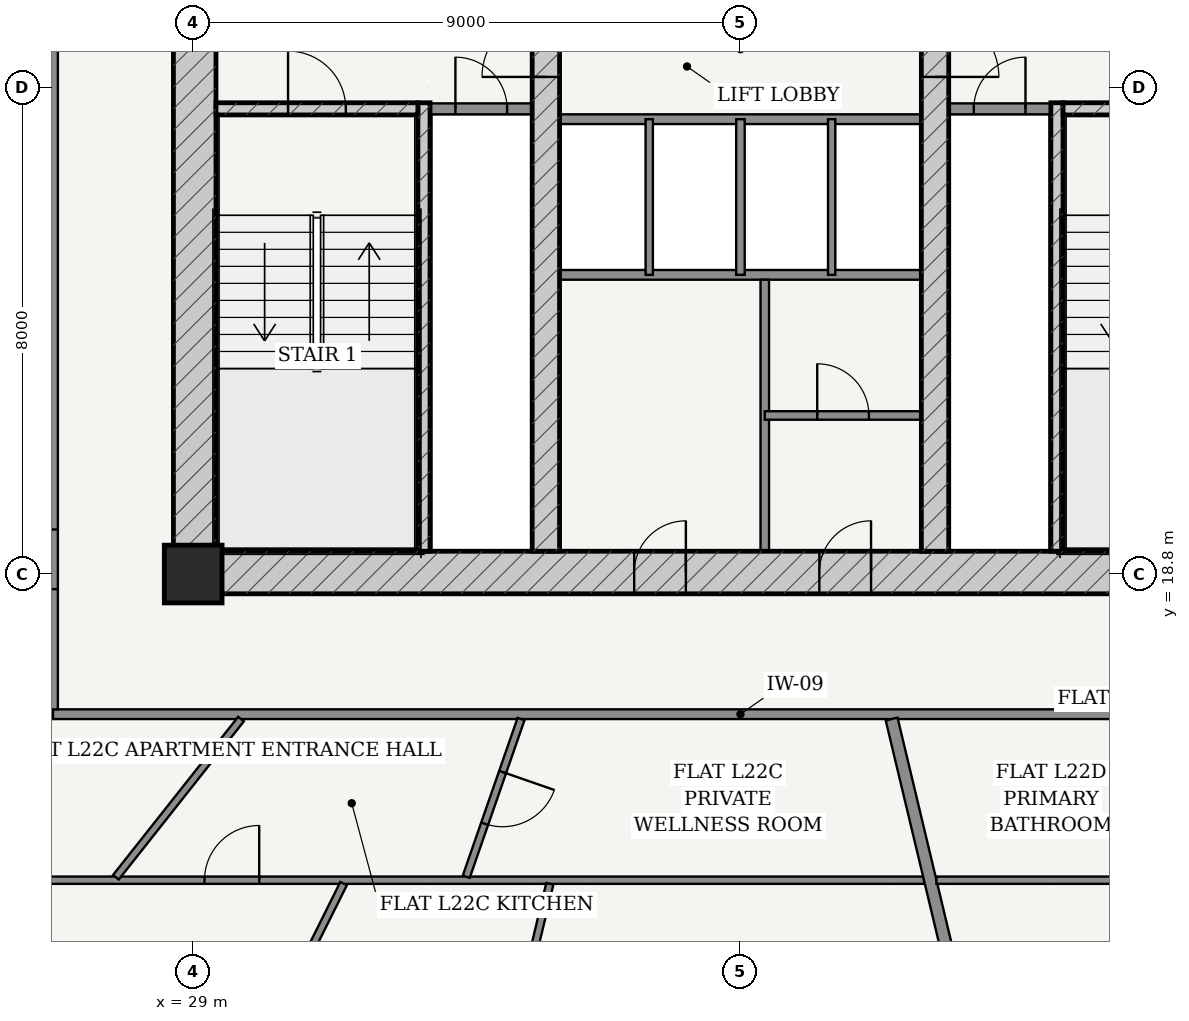
"""IFC4 building model, lengths in metres.
Left out: names, types, materials, properties, quantities, classifications, styles, units other than length and angle.
Written with IfcOpenShell. Run it as: python <this file> out.ifc"""

import sys

from ifc_helpers import new_model, si_unit, direction, frame, frame_2d, origin, origin_2d, place, context, subcontext, project, spatial, rectangle, extrude, source, transform, mapped, element, fill, save


model = new_model("IFC4")
c1 = context("Model", 3, precision=1e-05, world=origin(), true_north=direction((-0.2419218956, 0.970295726276)))
c2 = subcontext(c1, "Body", "Model", "MODEL_VIEW")
j1 = project(units=[si_unit("LENGTHUNIT", "METRE"), si_unit("PLANEANGLEUNIT", "RADIAN")], contexts=[c1])
p1 = place(None, origin())
s1 = spatial("IfcSite", under=j1, at=p1, CompositionType="ELEMENT")
p2 = place(p1, origin())
s2 = spatial("IfcBuilding", under=s1, at=p2, CompositionType="ELEMENT")
p3 = place(p2, frame((0.0, 0.0, 87.0)))
s3 = spatial("IfcBuildingStorey", under=s2, at=p3, CompositionType="ELEMENT", Elevation=87.0)
p4 = place(p3, frame((29.0, 18.8, 0.0), z_axis=(0.0, 0.0, 1.0), x_axis=(1.0, 0.0, 0.0)))
e1 = element("IfcColumn", 1, at=p4, inside=s3, PredefinedType="COLUMN", context=c2, shape_type="SweptSolid", body=[
    extrude(rectangle(XDim=0.95, YDim=0.95, at=origin_2d()), origin(), (0.0, 0.0, 1.0), 3.6),
])
p5 = place(p3, frame((28.675, 18.825, 0.0), z_axis=(0.0, 0.0, 1.0), x_axis=(1.0, 0.0, 0.0)))
e2 = element("IfcWall", 2, at=p5, inside=s3, PredefinedType="SHEAR", context=c2, shape_type="SweptSolid", body=[
    extrude(rectangle(XDim=18.65, YDim=0.7, at=frame_2d((9.325, 0.0))), origin(), (0.0, 0.0, 1.0), 3.325),
])
p6 = place(p5, frame((7.577, 0.0, 0.0)))
e3 = element("IfcOpeningElement", 3, at=p6, cuts=e2, PredefinedType="OPENING", context=c2, shape_type="SweptSolid", body=[
    extrude(rectangle(XDim=0.85, YDim=2.1, at=frame_2d((0.425, 1.05))), frame((0.0, 0.36, 0.0), z_axis=(0.0, -1.0, 0.0), x_axis=(1.0, 0.0, 0.0)), (0.0, 0.0, 1.0), 0.72),
])
p7 = place(p5, frame((10.623, 0.0, 0.0)))
e4 = element("IfcOpeningElement", 4, at=p7, cuts=e2, PredefinedType="OPENING", context=c2, shape_type="SweptSolid", body=[
    extrude(rectangle(XDim=0.85, YDim=2.1, at=frame_2d((0.425, 1.05))), frame((0.0, 0.36, 0.0), z_axis=(0.0, -1.0, 0.0), x_axis=(1.0, 0.0, 0.0)), (0.0, 0.0, 1.0), 0.72),
])
p8 = place(p3, frame((29.025, 19.175, 0.0), z_axis=(0.0, 0.0, 1.0), x_axis=(0.0, 1.0, 0.0)))
e5 = element("IfcWall", 5, at=p8, inside=s3, PredefinedType="SHEAR", context=c2, shape_type="SweptSolid", body=[
    extrude(rectangle(XDim=15.25, YDim=0.7, at=frame_2d((7.625, 0.0))), origin(), (0.0, 0.0, 1.0), 3.325),
])
p9 = place(p8, frame((9.875, 0.0, 0.0)))
e6 = element("IfcOpeningElement", 6, at=p9, cuts=e5, PredefinedType="OPENING", context=c2, shape_type="SweptSolid", body=[
    extrude(rectangle(XDim=1.5, YDim=2.2, at=frame_2d((0.75, 1.1))), frame((0.0, 0.36, 0.0), z_axis=(0.0, -1.0, 0.0), x_axis=(1.0, 0.0, 0.0)), (0.0, 0.0, 1.0), 0.72),
])
p10 = place(p3, frame((32.795, 19.175, 0.0), z_axis=(0.0, 0.0, 1.0), x_axis=(0.0, 1.0, 0.0)))
e7 = element("IfcWall", 7, at=p10, inside=s3, PredefinedType="SOLIDWALL", context=c2, shape_type="SweptSolid", body=[
    extrude(rectangle(XDim=7.375, YDim=0.2, at=frame_2d((3.688, 0.0))), origin(), (0.0, 0.0, 1.0), 3.325),
])
p11 = place(p3, frame((29.375, 26.45, 0.0), z_axis=(0.0, 0.0, 1.0), x_axis=(1.0, 0.0, 0.0)))
e8 = element("IfcWall", 8, at=p11, inside=s3, PredefinedType="SOLIDWALL", context=c2, shape_type="SweptSolid", body=[
    extrude(rectangle(XDim=3.32, YDim=0.2, at=frame_2d((1.66, 0.0))), origin(), (0.0, 0.0, 1.0), 3.325),
])
p12 = place(p11, frame((1.185, 0.0, 0.0)))
e9 = element("IfcOpeningElement", 9, at=p12, cuts=e8, PredefinedType="OPENING", context=c2, shape_type="SweptSolid", body=[
    extrude(rectangle(XDim=0.95, YDim=2.15, at=frame_2d((0.475, 1.075))), frame((0.0, 0.11, 0.0), z_axis=(0.0, -1.0, 0.0), x_axis=(1.0, 0.0, 0.0)), (0.0, 0.0, 1.0), 0.22),
])
p13 = place(p3, frame((43.205, 19.175, 0.0), z_axis=(0.0, 0.0, 1.0), x_axis=(0.0, 1.0, 0.0)))
e10 = element("IfcWall", 10, at=p13, inside=s3, PredefinedType="SOLIDWALL", context=c2, shape_type="SweptSolid", body=[
    extrude(rectangle(XDim=7.375, YDim=0.2, at=frame_2d((3.688, 0.0))), origin(), (0.0, 0.0, 1.0), 3.325),
])
p14 = place(p3, frame((43.305, 26.45, 0.0), z_axis=(0.0, 0.0, 1.0), x_axis=(1.0, 0.0, 0.0)))
e11 = element("IfcWall", 11, at=p14, inside=s3, PredefinedType="SOLIDWALL", context=c2, shape_type="SweptSolid", body=[
    extrude(rectangle(XDim=3.32, YDim=0.2, at=frame_2d((1.66, 0.0))), origin(), (0.0, 0.0, 1.0), 3.325),
])
p15 = place(p14, frame((1.185, 0.0, 0.0)))
e12 = element("IfcOpeningElement", 12, at=p15, cuts=e11, PredefinedType="OPENING", context=c2, shape_type="SweptSolid", body=[
    extrude(rectangle(XDim=0.95, YDim=2.15, at=frame_2d((0.475, 1.075))), frame((0.0, 0.11, 0.0), z_axis=(0.0, -1.0, 0.0), x_axis=(1.0, 0.0, 0.0)), (0.0, 0.0, 1.0), 0.22),
])
p16 = place(p3, frame((34.8, 19.175, 0.0), z_axis=(0.0, 0.0, 1.0), x_axis=(0.0, 1.0, 0.0)))
e13 = element("IfcWall", 13, at=p16, inside=s3, PredefinedType="SHEAR", context=c2, shape_type="SweptSolid", body=[
    extrude(rectangle(XDim=15.25, YDim=0.45, at=frame_2d((7.625, 0.0))), origin(), (0.0, 0.0, 1.0), 3.325),
])
p17 = place(p16, frame((7.8, 0.0, 0.0)))
e14 = element("IfcOpeningElement", 14, at=p17, cuts=e13, PredefinedType="OPENING", context=c2, shape_type="SweptSolid", body=[
    extrude(rectangle(XDim=1.05, YDim=2.15, at=frame_2d((0.525, 1.075))), frame((0.0, 0.235, 0.0), z_axis=(0.0, -1.0, 0.0), x_axis=(1.0, 0.0, 0.0)), (0.0, 0.0, 1.0), 0.47),
])
p18 = place(p3, frame((41.2, 19.175, 0.0), z_axis=(0.0, 0.0, 1.0), x_axis=(0.0, 1.0, 0.0)))
e15 = element("IfcWall", 15, at=p18, inside=s3, PredefinedType="SHEAR", context=c2, shape_type="SweptSolid", body=[
    extrude(rectangle(XDim=15.25, YDim=0.45, at=frame_2d((7.625, 0.0))), origin(), (0.0, 0.0, 1.0), 3.325),
])
p19 = place(p18, frame((7.8, 0.0, 0.0)))
e16 = element("IfcOpeningElement", 16, at=p19, cuts=e15, PredefinedType="OPENING", context=c2, shape_type="SweptSolid", body=[
    extrude(rectangle(XDim=1.05, YDim=2.15, at=frame_2d((0.525, 1.075))), frame((0.0, 0.235, 0.0), z_axis=(0.0, -1.0, 0.0), x_axis=(1.0, 0.0, 0.0)), (0.0, 0.0, 1.0), 0.47),
])
p20 = place(p3, frame((32.9, 26.45, 0.0), z_axis=(0.0, 0.0, 1.0), x_axis=(1.0, 0.0, 0.0)))
e17 = element("IfcWall", 17, at=p20, inside=s3, PredefinedType="PARTITIONING", context=c2, shape_type="SweptSolid", body=[
    extrude(rectangle(XDim=1.675, YDim=0.18, at=frame_2d((0.837, 0.0))), origin(), (0.0, 0.0, 1.0), 3.325),
])
p21 = place(p20, frame((0.413, 0.0, 0.0)))
e18 = element("IfcOpeningElement", 18, at=p21, cuts=e17, PredefinedType="OPENING", context=c2, shape_type="SweptSolid", body=[
    extrude(rectangle(XDim=0.85, YDim=2.1, at=frame_2d((0.425, 1.05))), frame((0.0, 0.1, 0.0), z_axis=(0.0, -1.0, 0.0), x_axis=(1.0, 0.0, 0.0)), (0.0, 0.0, 1.0), 0.2),
])
p22 = place(p3, frame((41.425, 26.45, 0.0), z_axis=(0.0, 0.0, 1.0), x_axis=(1.0, 0.0, 0.0)))
e19 = element("IfcWall", 19, at=p22, inside=s3, PredefinedType="PARTITIONING", context=c2, shape_type="SweptSolid", body=[
    extrude(rectangle(XDim=1.675, YDim=0.18, at=frame_2d((0.837, 0.0))), origin(), (0.0, 0.0, 1.0), 3.325),
])
p23 = place(p22, frame((0.413, 0.0, 0.0)))
e20 = element("IfcOpeningElement", 20, at=p23, cuts=e19, PredefinedType="OPENING", context=c2, shape_type="SweptSolid", body=[
    extrude(rectangle(XDim=0.85, YDim=2.1, at=frame_2d((0.425, 1.05))), frame((0.0, 0.1, 0.0), z_axis=(0.0, -1.0, 0.0), x_axis=(1.0, 0.0, 0.0)), (0.0, 0.0, 1.0), 0.2),
])
for number, where, z_axis, x_axis in (
    (21, (35.025, 26.28, 0.0), (0.0, 0.0, 1.0), (1.0, 0.0, 0.0)),
    (22, (35.025, 23.72, 0.0), (0.0, 0.0, 1.0), (1.0, 0.0, 0.0)),
):
    element("IfcWall", number, at=place(p3, frame(where, z_axis=z_axis, x_axis=x_axis)), inside=s3, PredefinedType="PARTITIONING", context=c2, shape_type="SweptSolid", body=[
        extrude(rectangle(XDim=5.95, YDim=0.16, at=frame_2d((2.975, 0.0))), origin(), (0.0, 0.0, 1.0), 3.325),
    ])
p24 = place(p3, frame((36.5, 23.72, 0.0), z_axis=(0.0, 0.0, 1.0), x_axis=(0.0, 1.0, 0.0)))
e23 = element("IfcWall", 23, at=p24, inside=s3, PredefinedType="PARTITIONING", context=c2, shape_type="SweptSolid", body=[
    extrude(rectangle(XDim=2.56, YDim=0.12, at=frame_2d((1.28, 0.0))), origin(), (0.0, 0.0, 1.0), 3.325),
])
p25 = place(p3, frame((38.0, 23.72, 0.0), z_axis=(0.0, 0.0, 1.0), x_axis=(0.0, 1.0, 0.0)))
e24 = element("IfcWall", 24, at=p25, inside=s3, PredefinedType="PARTITIONING", context=c2, shape_type="SweptSolid", body=[
    extrude(rectangle(XDim=2.56, YDim=0.14, at=frame_2d((1.28, 0.0))), origin(), (0.0, 0.0, 1.0), 3.325),
])
p26 = place(p3, frame((39.5, 23.72, 0.0), z_axis=(0.0, 0.0, 1.0), x_axis=(0.0, 1.0, 0.0)))
e25 = element("IfcWall", 25, at=p26, inside=s3, PredefinedType="PARTITIONING", context=c2, shape_type="SweptSolid", body=[
    extrude(rectangle(XDim=2.56, YDim=0.12, at=frame_2d((1.28, 0.0))), origin(), (0.0, 0.0, 1.0), 3.325),
])
p27 = place(p3, frame((38.4, 19.175, 0.0), z_axis=(0.0, 0.0, 1.0), x_axis=(0.0, 1.0, 0.0)))
e26 = element("IfcWall", 26, at=p27, inside=s3, PredefinedType="PARTITIONING", context=c2, shape_type="SweptSolid", body=[
    extrude(rectangle(XDim=4.465, YDim=0.14, at=frame_2d((2.232, 0.0))), origin(), (0.0, 0.0, 1.0), 3.325),
])
p28 = place(p3, frame((38.4, 21.407, 0.0), z_axis=(0.0, 0.0, 1.0), x_axis=(1.0, 0.0, 0.0)))
e27 = element("IfcWall", 27, at=p28, inside=s3, PredefinedType="PARTITIONING", context=c2, shape_type="SweptSolid", body=[
    extrude(rectangle(XDim=2.575, YDim=0.14, at=frame_2d((1.288, 0.0))), origin(), (0.0, 0.0, 1.0), 3.325),
])
p29 = place(p28, frame((0.863, 0.0, 0.0)))
e28 = element("IfcOpeningElement", 28, at=p29, cuts=e27, PredefinedType="OPENING", context=c2, shape_type="SweptSolid", body=[
    extrude(rectangle(XDim=0.85, YDim=2.1, at=frame_2d((0.425, 1.05))), frame((0.0, 0.08, 0.0), z_axis=(0.0, -1.0, 0.0), x_axis=(1.0, 0.0, 0.0)), (0.0, 0.0, 1.0), 0.16),
])
p30 = place(p3, frame((26.695, 16.495, 0.0), z_axis=(0.0, 0.0, 1.0), x_axis=(1.0, 0.0, 0.0)))
e29 = element("IfcWall", 29, at=p30, inside=s3, PredefinedType="PARTITIONING", context=c2, shape_type="SweptSolid", body=[
    extrude(rectangle(XDim=22.61, YDim=0.16, at=frame_2d((11.305, 0.0))), origin(), (0.0, 0.0, 1.0), 2.767),
])
p31 = place(p3, frame((26.695, 16.575, 0.0), z_axis=(0.0, 0.0, 1.0), x_axis=(0.0, 1.0, 0.0)))
e30 = element("IfcWall", 30, at=p31, inside=s3, PredefinedType="PARTITIONING", context=c2, shape_type="SweptSolid", body=[
    extrude(rectangle(XDim=20.45, YDim=0.16, at=frame_2d((10.225, 0.0))), origin(), (0.0, 0.0, 1.0), 2.767),
])
p32 = place(p31, frame((1.977, 0.0, 0.0)))
e31 = element("IfcOpeningElement", 31, at=p32, cuts=e30, PredefinedType="OPENING", context=c2, shape_type="SweptSolid", body=[
    extrude(rectangle(XDim=0.98, YDim=2.2, at=frame_2d((0.49, 1.1))), frame((0.0, 0.09, 0.0), z_axis=(0.0, -1.0, 0.0), x_axis=(1.0, 0.0, 0.0)), (0.0, 0.0, 1.0), 0.18),
])
p33 = place(p3, frame((41.019, 13.765, 0.0), z_axis=(0.0, 0.0, 1.0), x_axis=(-1.0, 0.0, 0.0)))
e32 = element("IfcWall", 32, at=p33, inside=s3, PredefinedType="PARTITIONING", context=c2, shape_type="SweptSolid", body=[
    extrude(rectangle(XDim=17.054, YDim=0.12, at=frame_2d((8.527, 0.0))), origin(), (0.0, 0.0, 1.0), 2.767),
])
p34 = place(p33, frame((10.933, 0.0, 0.0)))
e33 = element("IfcOpeningElement", 33, at=p34, cuts=e32, PredefinedType="OPENING", context=c2, shape_type="SweptSolid", body=[
    extrude(rectangle(XDim=0.9, YDim=2.15, at=frame_2d((0.45, 1.075))), frame((0.0, 0.07, 0.0), z_axis=(0.0, -1.0, 0.0), x_axis=(1.0, 0.0, 0.0)), (0.0, 0.0, 1.0), 0.14),
])
p35 = place(p3, frame((31.474, 13.709, 0.0), z_axis=(0.0, 0.0, 1.0), x_axis=(-0.446179583353, -0.894943450392, 0.0)))
e34 = element("IfcWall", 34, at=p35, inside=s3, PredefinedType="PARTITIONING", context=c2, shape_type="SweptSolid", body=[
    extrude(rectangle(XDim=8.125, YDim=0.12, at=frame_2d((4.062, 0.0))), origin(), (0.0, 0.0, 1.0), 2.767),
])
p36 = place(p35, frame((3.612, 0.0, 0.0)))
e35 = element("IfcOpeningElement", 35, at=p36, cuts=e34, PredefinedType="OPENING", context=c2, shape_type="SweptSolid", body=[
    extrude(rectangle(XDim=0.9, YDim=2.15, at=frame_2d((0.45, 1.075))), frame((0.0, 0.07, 0.0), z_axis=(0.0, -1.0, 0.0), x_axis=(1.0, 0.0, 0.0)), (0.0, 0.0, 1.0), 0.14),
])
p37 = place(p3, frame((34.865, 13.705, 0.0), z_axis=(0.0, 0.0, 1.0), x_axis=(-0.23282725047, -0.97251810854, 0.0)))
e36 = element("IfcWall", 36, at=p37, inside=s3, PredefinedType="PARTITIONING", context=c2, shape_type="SweptSolid", body=[
    extrude(rectangle(XDim=8.715, YDim=0.12, at=frame_2d((4.357, 0.0))), origin(), (0.0, 0.0, 1.0), 2.767),
])
p38 = place(p37, frame((2.831, 0.0, 0.0)))
e37 = element("IfcOpeningElement", 37, at=p38, cuts=e36, PredefinedType="OPENING", context=c2, shape_type="SweptSolid", body=[
    extrude(rectangle(XDim=0.9, YDim=2.15, at=frame_2d((0.45, 1.075))), frame((0.0, 0.07, 0.0), z_axis=(0.0, -1.0, 0.0), x_axis=(1.0, 0.0, 0.0)), (0.0, 0.0, 1.0), 0.14),
])
p39 = place(p3, frame((29.787, 16.415, 0.0), z_axis=(0.0, 0.0, 1.0), x_axis=(-0.62033143471, -0.784339793145, 0.0)))
e38 = element("IfcWall", 38, at=p39, inside=s3, PredefinedType="PARTITIONING", context=c2, shape_type="SweptSolid", body=[
    extrude(rectangle(XDim=3.317, YDim=0.12, at=frame_2d((1.658, 0.0))), origin(), (0.0, 0.0, 1.0), 3.004),
])
p40 = place(p3, frame((34.392, 16.415, 0.0), z_axis=(0.0, 0.0, 1.0), x_axis=(-0.328268661855, -0.94458439837, 0.0)))
e39 = element("IfcWall", 39, at=p40, inside=s3, PredefinedType="PARTITIONING", context=c2, shape_type="SweptSolid", body=[
    extrude(rectangle(XDim=2.744, YDim=0.12, at=frame_2d((1.372, 0.0))), origin(), (0.0, 0.0, 1.0), 3.325),
])
p41 = place(p40, frame((0.922, 0.0, 0.0)))
e40 = element("IfcOpeningElement", 40, at=p41, cuts=e39, PredefinedType="OPENING", context=c2, shape_type="SweptSolid", body=[
    extrude(rectangle(XDim=0.9, YDim=2.15, at=frame_2d((0.45, 1.075))), frame((0.0, 0.07, 0.0), z_axis=(0.0, -1.0, 0.0), x_axis=(1.0, 0.0, 0.0)), (0.0, 0.0, 1.0), 0.14),
])
p42 = place(p3, frame((40.486, 16.415, 0.0), z_axis=(0.0, 0.0, 1.0), x_axis=(0.232829417917, -0.972517589636, 0.0)))
e41 = element("IfcWall", 41, at=p42, inside=s3, PredefinedType="PARTITIONING", context=c2, shape_type="SweptSolid", body=[
    extrude(rectangle(XDim=11.502, YDim=0.2, at=frame_2d((5.751, 0.0))), origin(), (0.0, 0.0, 1.0), 2.767),
])
p43 = place(p3, frame((52.035, 13.765, 0.0), z_axis=(0.0, 0.0, 1.0), x_axis=(-1.0, 0.0, 0.0)))
e42 = element("IfcWall", 42, at=p43, inside=s3, PredefinedType="PARTITIONING", context=c2, shape_type="SweptSolid", body=[
    extrude(rectangle(XDim=10.812, YDim=0.12, at=frame_2d((5.406, 0.0))), origin(), (0.0, 0.0, 1.0), 2.767),
])
p44 = place(p43, frame((2.145, 0.0, 0.0)))
e43 = element("IfcOpeningElement", 43, at=p44, cuts=e42, PredefinedType="OPENING", context=c2, shape_type="SweptSolid", body=[
    extrude(rectangle(XDim=0.9, YDim=2.15, at=frame_2d((0.45, 1.075))), frame((0.0, 0.07, 0.0), z_axis=(0.0, -1.0, 0.0), x_axis=(1.0, 0.0, 0.0)), (0.0, 0.0, 1.0), 0.14),
])
m1 = source(origin(), c2, "Body", "SweptSolid", [
    extrude(rectangle(XDim=1.05, YDim=2.15, at=frame_2d((0.525, 1.075))), frame((0.0, 0.025, 0.0), z_axis=(0.0, -1.0, 0.0), x_axis=(1.0, 0.0, 0.0)), (0.0, 0.0, 1.0), 0.05),
])
p45 = place(p17, origin())
e44 = element("IfcDoor", 44, at=p45, inside=s3, OperationType="SINGLE_SWING_LEFT", PredefinedType="DOOR", context=c2, shape_type="MappedRepresentation", body=[
    mapped(m1, transform((0.0, 0.0, 0.0), scale=1.0)),
])
fill(e14, e44)
p46 = place(p19, frame((1.05, 0.0, 0.0), z_axis=(0.0, 0.0, 1.0), x_axis=(-1.0, 0.0, 0.0)))
e45 = element("IfcDoor", 45, at=p46, inside=s3, OperationType="SINGLE_SWING_RIGHT", PredefinedType="DOOR", context=c2, shape_type="MappedRepresentation", body=[
    mapped(m1, transform((0.0, 0.0, 0.0), scale=1.0)),
])
fill(e16, e45)
m2 = source(origin(), c2, "Body", "SweptSolid", [
    extrude(rectangle(XDim=0.95, YDim=2.15, at=frame_2d((0.475, 1.075))), frame((0.0, 0.025, 0.0), z_axis=(0.0, -1.0, 0.0), x_axis=(1.0, 0.0, 0.0)), (0.0, 0.0, 1.0), 0.05),
])
p47 = place(p12, origin())
e46 = element("IfcDoor", 46, at=p47, inside=s3, OperationType="SINGLE_SWING_LEFT", PredefinedType="DOOR", context=c2, shape_type="MappedRepresentation", body=[
    mapped(m2, transform((0.0, 0.0, 0.0), scale=1.0)),
])
fill(e9, e46)
m3 = source(origin(), c2, "Body", "SweptSolid", [
    extrude(rectangle(XDim=0.85, YDim=2.1, at=frame_2d((0.425, 1.05))), frame((0.0, 0.025, 0.0), z_axis=(0.0, -1.0, 0.0), x_axis=(1.0, 0.0, 0.0)), (0.0, 0.0, 1.0), 0.05),
])
p48 = place(p21, origin())
e47 = element("IfcDoor", 47, at=p48, inside=s3, OperationType="SINGLE_SWING_LEFT", PredefinedType="DOOR", context=c2, shape_type="MappedRepresentation", body=[
    mapped(m3, transform((0.0, 0.0, 0.0), scale=1.0)),
])
fill(e18, e47)
p49 = place(p23, origin())
e48 = element("IfcDoor", 48, at=p49, inside=s3, OperationType="SINGLE_SWING_RIGHT", PredefinedType="DOOR", context=c2, shape_type="MappedRepresentation", body=[
    mapped(m3, transform((0.0, 0.0, 0.0), scale=1.0)),
])
fill(e20, e48)
p50 = place(p6, origin())
e49 = element("IfcDoor", 49, at=p50, inside=s3, OperationType="SINGLE_SWING_RIGHT", PredefinedType="DOOR", context=c2, shape_type="MappedRepresentation", body=[
    mapped(m3, transform((0.0, 0.0, 0.0), scale=1.0)),
])
fill(e3, e49)
p51 = place(p7, origin())
e50 = element("IfcDoor", 50, at=p51, inside=s3, OperationType="SINGLE_SWING_RIGHT", PredefinedType="DOOR", context=c2, shape_type="MappedRepresentation", body=[
    mapped(m3, transform((0.0, 0.0, 0.0), scale=1.0)),
])
fill(e4, e50)
p52 = place(p29, origin())
e51 = element("IfcDoor", 51, at=p52, inside=s3, OperationType="SINGLE_SWING_LEFT", PredefinedType="DOOR", context=c2, shape_type="MappedRepresentation", body=[
    mapped(m3, transform((0.0, 0.0, 0.0), scale=1.0)),
])
fill(e28, e51)
m4 = source(origin(), c2, "Body", "SweptSolid", [
    extrude(rectangle(XDim=0.98, YDim=2.2, at=frame_2d((0.49, 1.1))), frame((0.0, 0.025, 0.0), z_axis=(0.0, -1.0, 0.0), x_axis=(1.0, 0.0, 0.0)), (0.0, 0.0, 1.0), 0.05),
])
p53 = place(p32, origin())
e52 = element("IfcDoor", 52, at=p53, inside=s3, OperationType="SINGLE_SWING_LEFT", PredefinedType="DOOR", context=c2, shape_type="MappedRepresentation", body=[
    mapped(m4, transform((0.0, 0.0, 0.0), scale=1.0)),
])
fill(e31, e52)
m5 = source(origin(), c2, "Body", "SweptSolid", [
    extrude(rectangle(XDim=0.9, YDim=2.15, at=frame_2d((0.45, 1.075))), frame((0.0, 0.025, 0.0), z_axis=(0.0, -1.0, 0.0), x_axis=(1.0, 0.0, 0.0)), (0.0, 0.0, 1.0), 0.05),
])
p54 = place(p34, frame((0.9, 0.0, 0.0), z_axis=(0.0, 0.0, 1.0), x_axis=(-1.0, 0.0, 0.0)))
e53 = element("IfcDoor", 53, at=p54, inside=s3, OperationType="SINGLE_SWING_RIGHT", PredefinedType="DOOR", context=c2, shape_type="MappedRepresentation", body=[
    mapped(m5, transform((0.0, 0.0, 0.0), scale=1.0)),
])
fill(e33, e53)
p55 = place(p41, origin())
e54 = element("IfcDoor", 54, at=p55, inside=s3, OperationType="SINGLE_SWING_LEFT", PredefinedType="DOOR", context=c2, shape_type="MappedRepresentation", body=[
    mapped(m5, transform((0.0, 0.0, 0.0), scale=1.0)),
])
fill(e40, e54)
save(model, sys.argv[1])
